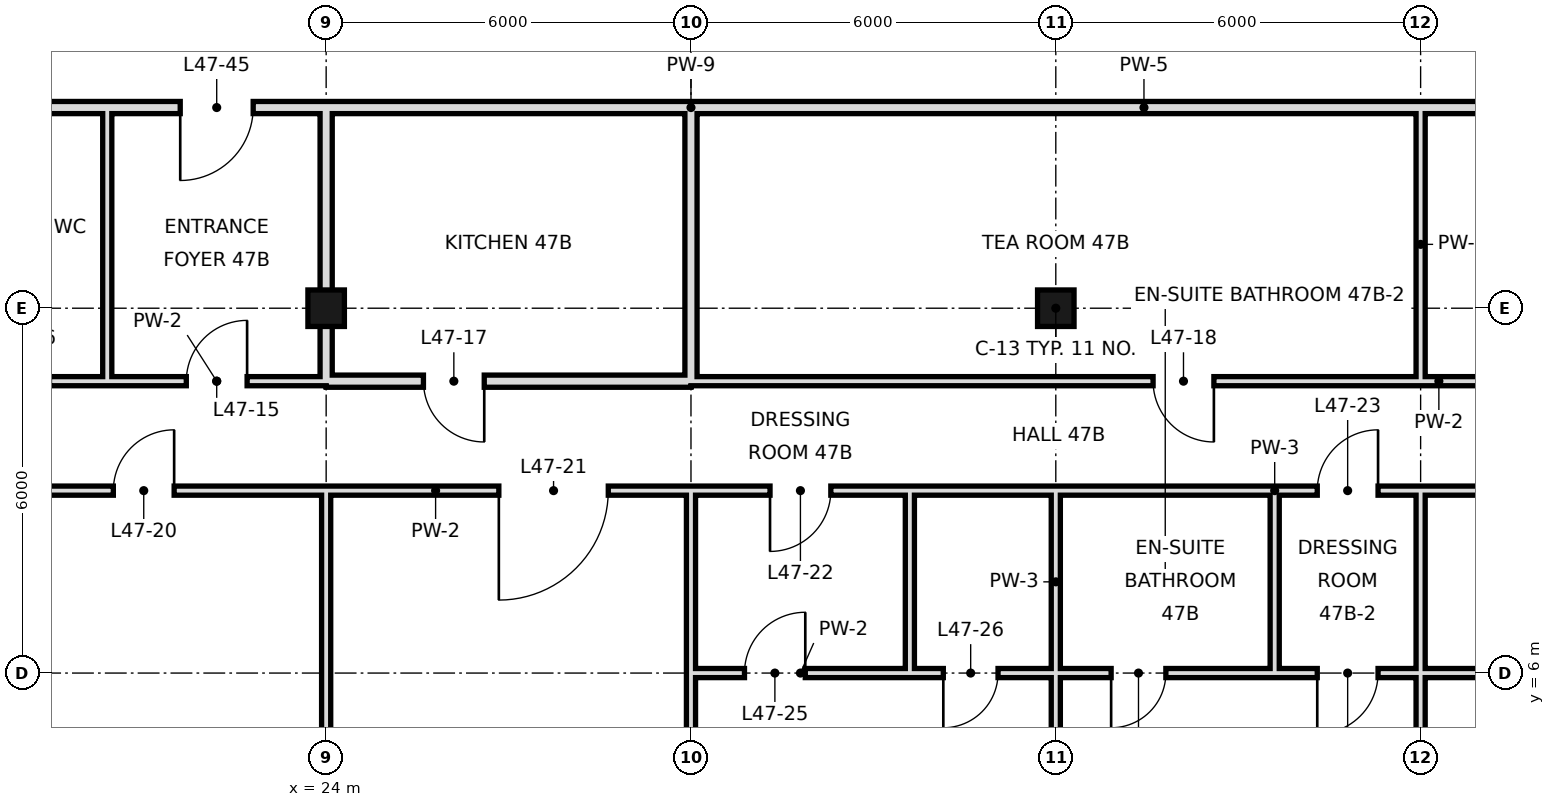
"""IFC4 building model, lengths in metres.
Left out: names, types, materials, properties, quantities, classifications, styles, units other than length and angle.
Written with IfcOpenShell. Run it as: python <this file> out.ifc"""

import sys

from ifc_helpers import new_model, si_unit, direction, frame, frame_2d, origin, origin_2d, place, context, subcontext, project, spatial, rectangle, hollow_rectangle, extrude, element, fill, save


model = new_model("IFC4")
c1 = context("Model", 3, precision=1e-05, world=origin(), true_north=direction((0.0, 1.0)))
c2 = subcontext(c1, "Body", "Model", "MODEL_VIEW")
j1 = project(units=[si_unit("LENGTHUNIT", "METRE"), si_unit("PLANEANGLEUNIT", "RADIAN")], contexts=[c1])
p1 = place(None, origin())
s1 = spatial("IfcSite", under=j1, at=p1, CompositionType="ELEMENT")
p2 = place(p1, origin())
s2 = spatial("IfcBuilding", under=s1, at=p2, CompositionType="ELEMENT")
p3 = place(p2, frame((0.0, 0.0, 202.8)))
s3 = spatial("IfcBuildingStorey", under=s2, at=p3, CompositionType="ELEMENT", Elevation=202.8)
for number, where, z_axis, x_axis in (
    (1, (24.0, 12.0, 0.0), (0.0, 0.0, 1.0), (1.0, 0.0, 0.0)),
    (2, (36.0, 12.0, 0.0), (0.0, 0.0, 1.0), (1.0, 0.0, 0.0)),
):
    element("IfcColumn", number, at=place(p3, frame(where, z_axis=z_axis, x_axis=x_axis)), inside=s3, PredefinedType="COLUMN", context=c2, shape_type="SweptSolid", body=[
        extrude(hollow_rectangle(XDim=0.6, YDim=0.6, WallThickness=0.028, at=origin_2d()), origin(), (0.0, 0.0, 1.0), 3.6),
    ])
p4 = place(p3, frame((20.4, 10.8, 0.0), z_axis=(0.0, 0.0, 1.0), x_axis=(0.0, 1.0, 0.0)))
e3 = element("IfcWall", 3, at=p4, inside=s3, PredefinedType="PARTITIONING", context=c2, shape_type="SweptSolid", body=[
    extrude(rectangle(XDim=4.5, YDim=0.15, at=frame_2d((2.25, 0.0))), origin(), (0.0, 0.0, 1.0), 3.42),
])
p5 = place(p3, frame((24.0, 10.8, 0.0), z_axis=(0.0, 0.0, 1.0), x_axis=(0.0, 1.0, 0.0)))
e4 = element("IfcWall", 4, at=p5, inside=s3, PredefinedType="SOLIDWALL", context=c2, shape_type="SweptSolid", body=[
    extrude(rectangle(XDim=4.5, YDim=0.2, at=frame_2d((2.25, 0.0))), origin(), (0.0, 0.0, 1.0), 2.72),
])
p6 = place(p3, frame((24.0, 0.0, 0.0), z_axis=(0.0, 0.0, 1.0), x_axis=(0.0, 1.0, 0.0)))
e5 = element("IfcWall", 5, at=p6, inside=s3, PredefinedType="PARTITIONING", context=c2, shape_type="SweptSolid", body=[
    extrude(rectangle(XDim=9.0, YDim=0.15, at=frame_2d((4.5, 0.0))), origin(), (0.0, 0.0, 1.0), 2.72),
])
p7 = place(p3, frame((30.0, 10.8, 0.0), z_axis=(0.0, 0.0, 1.0), x_axis=(0.0, 1.0, 0.0)))
e6 = element("IfcWall", 6, at=p7, inside=s3, PredefinedType="SOLIDWALL", context=c2, shape_type="SweptSolid", body=[
    extrude(rectangle(XDim=4.5, YDim=0.2, at=frame_2d((2.25, 0.0))), origin(), (0.0, 0.0, 1.0), 2.72),
])
p8 = place(p3, frame((30.0, -0.6, 0.0), z_axis=(0.0, 0.0, 1.0), x_axis=(0.0, 1.0, 0.0)))
e7 = element("IfcWall", 7, at=p8, inside=s3, PredefinedType="PARTITIONING", context=c2, shape_type="SweptSolid", body=[
    extrude(rectangle(XDim=9.6, YDim=0.15, at=frame_2d((4.8, 0.0))), origin(), (0.0, 0.0, 1.0), 2.72),
])
p9 = place(p3, frame((33.6, 6.0, 0.0), z_axis=(0.0, 0.0, 1.0), x_axis=(0.0, 1.0, 0.0)))
e8 = element("IfcWall", 8, at=p9, inside=s3, PredefinedType="PARTITIONING", context=c2, shape_type="SweptSolid", body=[
    extrude(rectangle(XDim=3.0, YDim=0.15, at=frame_2d((1.5, 0.0))), origin(), (0.0, 0.0, 1.0), 3.42),
])
p10 = place(p3, frame((36.0, 0.0, 0.0), z_axis=(0.0, 0.0, 1.0), x_axis=(0.0, 1.0, 0.0)))
e9 = element("IfcWall", 9, at=p10, inside=s3, PredefinedType="PARTITIONING", context=c2, shape_type="SweptSolid", body=[
    extrude(rectangle(XDim=6.0, YDim=0.15, at=frame_2d((3.0, 0.0))), origin(), (0.0, 0.0, 1.0), 2.72),
])
p11 = place(p3, frame((36.0, 6.0, 0.0), z_axis=(0.0, 0.0, 1.0), x_axis=(0.0, 1.0, 0.0)))
e10 = element("IfcWall", 10, at=p11, inside=s3, PredefinedType="PARTITIONING", context=c2, shape_type="SweptSolid", body=[
    extrude(rectangle(XDim=3.0, YDim=0.15, at=frame_2d((1.5, 0.0))), origin(), (0.0, 0.0, 1.0), 2.72),
])
p12 = place(p3, frame((39.6, 6.0, 0.0), z_axis=(0.0, 0.0, 1.0), x_axis=(0.0, 1.0, 0.0)))
e11 = element("IfcWall", 11, at=p12, inside=s3, PredefinedType="PARTITIONING", context=c2, shape_type="SweptSolid", body=[
    extrude(rectangle(XDim=3.0, YDim=0.15, at=frame_2d((1.5, 0.0))), origin(), (0.0, 0.0, 1.0), 3.42),
])
p13 = place(p3, frame((42.0, -0.6, 0.0), z_axis=(0.0, 0.0, 1.0), x_axis=(0.0, 1.0, 0.0)))
e12 = element("IfcWall", 12, at=p13, inside=s3, PredefinedType="PARTITIONING", context=c2, shape_type="SweptSolid", body=[
    extrude(rectangle(XDim=9.6, YDim=0.15, at=frame_2d((4.8, 0.0))), origin(), (0.0, 0.0, 1.0), 2.72),
])
p14 = place(p3, frame((42.0, 10.8, 0.0), z_axis=(0.0, 0.0, 1.0), x_axis=(0.0, 1.0, 0.0)))
e13 = element("IfcWall", 13, at=p14, inside=s3, PredefinedType="PARTITIONING", context=c2, shape_type="SweptSolid", body=[
    extrude(rectangle(XDim=4.5, YDim=0.15, at=frame_2d((2.25, 0.0))), origin(), (0.0, 0.0, 1.0), 2.72),
])
p15 = place(p3, frame((24.0, 10.8, 0.0), z_axis=(0.0, 0.0, 1.0), x_axis=(1.0, 0.0, 0.0)))
e14 = element("IfcWall", 14, at=p15, inside=s3, PredefinedType="SOLIDWALL", context=c2, shape_type="SweptSolid", body=[
    extrude(rectangle(XDim=6.0, YDim=0.2, at=frame_2d((3.0, 0.0))), origin(), (0.0, 0.0, 1.0), 2.72),
])
p16 = place(p15, frame((1.6, 0.0, 0.0)))
e15 = element("IfcOpeningElement", 15, at=p16, cuts=e14, PredefinedType="OPENING", context=c2, shape_type="SweptSolid", body=[
    extrude(rectangle(XDim=1.0, YDim=2.4, at=frame_2d((0.5, 1.2))), frame((0.0, 0.11, 0.0), z_axis=(0.0, -1.0, 0.0), x_axis=(1.0, 0.0, 0.0)), (0.0, 0.0, 1.0), 0.22),
])
p17 = place(p3, frame((20.4, 10.8, 0.0), z_axis=(0.0, 0.0, 1.0), x_axis=(1.0, 0.0, 0.0)))
e16 = element("IfcWall", 16, at=p17, inside=s3, PredefinedType="PARTITIONING", context=c2, shape_type="SweptSolid", body=[
    extrude(rectangle(XDim=3.6, YDim=0.15, at=frame_2d((1.8, 0.0))), origin(), (0.0, 0.0, 1.0), 3.42),
])
p18 = place(p17, frame((1.3, 0.0, 0.0)))
e17 = element("IfcOpeningElement", 17, at=p18, cuts=e16, PredefinedType="OPENING", context=c2, shape_type="SweptSolid", body=[
    extrude(rectangle(XDim=1.0, YDim=2.4, at=frame_2d((0.5, 1.2))), frame((0.0, 0.085, 0.0), z_axis=(0.0, -1.0, 0.0), x_axis=(1.0, 0.0, 0.0)), (0.0, 0.0, 1.0), 0.17),
])
p19 = place(p3, frame((30.0, 10.8, 0.0), z_axis=(0.0, 0.0, 1.0), x_axis=(1.0, 0.0, 0.0)))
e18 = element("IfcWall", 18, at=p19, inside=s3, PredefinedType="PARTITIONING", context=c2, shape_type="SweptSolid", body=[
    extrude(rectangle(XDim=24.6, YDim=0.15, at=frame_2d((12.3, 0.0))), origin(), (0.0, 0.0, 1.0), 3.42),
])
p20 = place(p19, frame((7.6, 0.0, 0.0)))
e19 = element("IfcOpeningElement", 19, at=p20, cuts=e18, PredefinedType="OPENING", context=c2, shape_type="SweptSolid", body=[
    extrude(rectangle(XDim=1.0, YDim=2.4, at=frame_2d((0.5, 1.2))), frame((0.0, 0.085, 0.0), z_axis=(0.0, -1.0, 0.0), x_axis=(1.0, 0.0, 0.0)), (0.0, 0.0, 1.0), 0.17),
])
p21 = place(p19, frame((15.4, 0.0, 0.0)))
e20 = element("IfcOpeningElement", 20, at=p21, cuts=e18, PredefinedType="OPENING", context=c2, shape_type="SweptSolid", body=[
    extrude(rectangle(XDim=1.0, YDim=2.4, at=frame_2d((0.5, 1.2))), frame((0.0, 0.085, 0.0), z_axis=(0.0, -1.0, 0.0), x_axis=(1.0, 0.0, 0.0)), (0.0, 0.0, 1.0), 0.17),
])
p22 = place(p3, frame((15.6, 10.8, 0.0), z_axis=(0.0, 0.0, 1.0), x_axis=(1.0, 0.0, 0.0)))
e21 = element("IfcWall", 21, at=p22, inside=s3, PredefinedType="PARTITIONING", context=c2, shape_type="SweptSolid", body=[
    extrude(rectangle(XDim=4.8, YDim=0.15, at=frame_2d((2.4, 0.0))), origin(), (0.0, 0.0, 1.0), 3.42),
])
p23 = place(p22, frame((0.75, 0.0, 0.0)))
e22 = element("IfcOpeningElement", 22, at=p23, cuts=e21, PredefinedType="OPENING", context=c2, shape_type="SweptSolid", body=[
    extrude(rectangle(XDim=0.9, YDim=2.4, at=frame_2d((0.45, 1.2))), frame((0.0, 0.085, 0.0), z_axis=(0.0, -1.0, 0.0), x_axis=(1.0, 0.0, 0.0)), (0.0, 0.0, 1.0), 0.17),
])
p24 = place(p22, frame((2.95, 0.0, 0.0)))
e23 = element("IfcOpeningElement", 23, at=p24, cuts=e21, PredefinedType="OPENING", context=c2, shape_type="SweptSolid", body=[
    extrude(rectangle(XDim=0.9, YDim=2.4, at=frame_2d((0.45, 1.2))), frame((0.0, 0.085, 0.0), z_axis=(0.0, -1.0, 0.0), x_axis=(1.0, 0.0, 0.0)), (0.0, 0.0, 1.0), 0.17),
])
p25 = place(p3, frame((3.1, 15.3, 0.0), z_axis=(0.0, 0.0, 1.0), x_axis=(1.0, 0.0, 0.0)))
e24 = element("IfcWall", 24, at=p25, inside=s3, PredefinedType="SOLIDWALL", context=c2, shape_type="SweptSolid", body=[
    extrude(rectangle(XDim=20.9, YDim=0.2, at=frame_2d((10.45, 0.0))), origin(), (0.0, 0.0, 1.0), 2.72),
])
p26 = place(p25, frame((9.72, 0.0, 0.0)))
e25 = element("IfcOpeningElement", 25, at=p26, cuts=e24, PredefinedType="OPENING", context=c2, shape_type="SweptSolid", body=[
    extrude(rectangle(XDim=1.2, YDim=2.4, at=frame_2d((0.6, 1.2))), frame((0.0, 0.11, 0.0), z_axis=(0.0, -1.0, 0.0), x_axis=(1.0, 0.0, 0.0)), (0.0, 0.0, 1.0), 0.22),
])
p27 = place(p25, frame((18.5, 0.0, 0.0)))
e26 = element("IfcOpeningElement", 26, at=p27, cuts=e24, PredefinedType="OPENING", context=c2, shape_type="SweptSolid", body=[
    extrude(rectangle(XDim=1.2, YDim=2.4, at=frame_2d((0.6, 1.2))), frame((0.0, 0.11, 0.0), z_axis=(0.0, -1.0, 0.0), x_axis=(1.0, 0.0, 0.0)), (0.0, 0.0, 1.0), 0.22),
])
p28 = place(p3, frame((30.0, 15.3, 0.0), z_axis=(0.0, 0.0, 1.0), x_axis=(1.0, 0.0, 0.0)))
e27 = element("IfcWall", 27, at=p28, inside=s3, PredefinedType="SOLIDWALL", context=c2, shape_type="SweptSolid", body=[
    extrude(rectangle(XDim=14.9, YDim=0.2, at=frame_2d((7.45, 0.0))), origin(), (0.0, 0.0, 1.0), 2.72),
])
p29 = place(p3, frame((24.0, 15.3, 0.0), z_axis=(0.0, 0.0, 1.0), x_axis=(1.0, 0.0, 0.0)))
e28 = element("IfcWall", 28, at=p29, inside=s3, PredefinedType="SOLIDWALL", context=c2, shape_type="SweptSolid", body=[
    extrude(rectangle(XDim=6.0, YDim=0.2, at=frame_2d((3.0, 0.0))), origin(), (0.0, 0.0, 1.0), 2.72),
])
p30 = place(p3, frame((30.0, 6.0, 0.0), z_axis=(0.0, 0.0, 1.0), x_axis=(1.0, 0.0, 0.0)))
e29 = element("IfcWall", 29, at=p30, inside=s3, PredefinedType="PARTITIONING", context=c2, shape_type="SweptSolid", body=[
    extrude(rectangle(XDim=3.6, YDim=0.15, at=frame_2d((1.8, 0.0))), origin(), (0.0, 0.0, 1.0), 2.97),
])
p31 = place(p30, frame((0.88, 0.0, 0.0)))
e30 = element("IfcOpeningElement", 30, at=p31, cuts=e29, PredefinedType="OPENING", context=c2, shape_type="SweptSolid", body=[
    extrude(rectangle(XDim=1.0, YDim=2.4, at=frame_2d((0.5, 1.2))), frame((0.0, 0.085, 0.0), z_axis=(0.0, -1.0, 0.0), x_axis=(1.0, 0.0, 0.0)), (0.0, 0.0, 1.0), 0.17),
])
p32 = place(p3, frame((39.6, 6.0, 0.0), z_axis=(0.0, 0.0, 1.0), x_axis=(1.0, 0.0, 0.0)))
e31 = element("IfcWall", 31, at=p32, inside=s3, PredefinedType="PARTITIONING", context=c2, shape_type="SweptSolid", body=[
    extrude(rectangle(XDim=14.4, YDim=0.15, at=frame_2d((7.2, 0.0))), origin(), (0.0, 0.0, 1.0), 2.97),
])
p33 = place(p32, frame((0.7, 0.0, 0.0)))
e32 = element("IfcOpeningElement", 32, at=p33, cuts=e31, PredefinedType="OPENING", context=c2, shape_type="SweptSolid", body=[
    extrude(rectangle(XDim=1.0, YDim=2.4, at=frame_2d((0.5, 1.2))), frame((0.0, 0.085, 0.0), z_axis=(0.0, -1.0, 0.0), x_axis=(1.0, 0.0, 0.0)), (0.0, 0.0, 1.0), 0.17),
])
p34 = place(p32, frame((9.44, 0.0, 0.0)))
e33 = element("IfcOpeningElement", 33, at=p34, cuts=e31, PredefinedType="OPENING", context=c2, shape_type="SweptSolid", body=[
    extrude(rectangle(XDim=1.8, YDim=2.4, at=frame_2d((0.9, 1.2))), frame((0.0, 0.085, 0.0), z_axis=(0.0, -1.0, 0.0), x_axis=(1.0, 0.0, 0.0)), (0.0, 0.0, 1.0), 0.17),
])
p35 = place(p3, frame((33.6, 6.0, 0.0), z_axis=(0.0, 0.0, 1.0), x_axis=(1.0, 0.0, 0.0)))
e34 = element("IfcWall", 34, at=p35, inside=s3, PredefinedType="PARTITIONING", context=c2, shape_type="SweptSolid", body=[
    extrude(rectangle(XDim=6.0, YDim=0.15, at=frame_2d((3.0, 0.0))), origin(), (0.0, 0.0, 1.0), 2.97),
])
p36 = place(p35, frame((0.55, 0.0, 0.0)))
e35 = element("IfcOpeningElement", 35, at=p36, cuts=e34, PredefinedType="OPENING", context=c2, shape_type="SweptSolid", body=[
    extrude(rectangle(XDim=0.9, YDim=2.4, at=frame_2d((0.45, 1.2))), frame((0.0, 0.085, 0.0), z_axis=(0.0, -1.0, 0.0), x_axis=(1.0, 0.0, 0.0)), (0.0, 0.0, 1.0), 0.17),
])
p37 = place(p35, frame((3.31, 0.0, 0.0)))
e36 = element("IfcOpeningElement", 36, at=p37, cuts=e34, PredefinedType="OPENING", context=c2, shape_type="SweptSolid", body=[
    extrude(rectangle(XDim=0.9, YDim=2.4, at=frame_2d((0.45, 1.2))), frame((0.0, 0.085, 0.0), z_axis=(0.0, -1.0, 0.0), x_axis=(1.0, 0.0, 0.0)), (0.0, 0.0, 1.0), 0.17),
])
p38 = place(p3, frame((18.0, 9.0, 0.0), z_axis=(0.0, 0.0, 1.0), x_axis=(1.0, 0.0, 0.0)))
e37 = element("IfcWall", 37, at=p38, inside=s3, PredefinedType="PARTITIONING", context=c2, shape_type="SweptSolid", body=[
    extrude(rectangle(XDim=15.6, YDim=0.15, at=frame_2d((7.8, 0.0))), origin(), (0.0, 0.0, 1.0), 3.42),
])
p39 = place(p38, frame((2.5, 0.0, 0.0)))
e38 = element("IfcOpeningElement", 38, at=p39, cuts=e37, PredefinedType="OPENING", context=c2, shape_type="SweptSolid", body=[
    extrude(rectangle(XDim=1.0, YDim=2.4, at=frame_2d((0.5, 1.2))), frame((0.0, 0.085, 0.0), z_axis=(0.0, -1.0, 0.0), x_axis=(1.0, 0.0, 0.0)), (0.0, 0.0, 1.0), 0.17),
])
p40 = place(p38, frame((8.84, 0.0, 0.0)))
e39 = element("IfcOpeningElement", 39, at=p40, cuts=e37, PredefinedType="OPENING", context=c2, shape_type="SweptSolid", body=[
    extrude(rectangle(XDim=1.8, YDim=2.4, at=frame_2d((0.9, 1.2))), frame((0.0, 0.085, 0.0), z_axis=(0.0, -1.0, 0.0), x_axis=(1.0, 0.0, 0.0)), (0.0, 0.0, 1.0), 0.17),
])
p41 = place(p38, frame((13.3, 0.0, 0.0)))
e40 = element("IfcOpeningElement", 40, at=p41, cuts=e37, PredefinedType="OPENING", context=c2, shape_type="SweptSolid", body=[
    extrude(rectangle(XDim=1.0, YDim=2.4, at=frame_2d((0.5, 1.2))), frame((0.0, 0.085, 0.0), z_axis=(0.0, -1.0, 0.0), x_axis=(1.0, 0.0, 0.0)), (0.0, 0.0, 1.0), 0.17),
])
p42 = place(p3, frame((39.6, 9.0, 0.0), z_axis=(0.0, 0.0, 1.0), x_axis=(1.0, 0.0, 0.0)))
e41 = element("IfcWall", 41, at=p42, inside=s3, PredefinedType="PARTITIONING", context=c2, shape_type="SweptSolid", body=[
    extrude(rectangle(XDim=15.0, YDim=0.15, at=frame_2d((7.5, 0.0))), origin(), (0.0, 0.0, 1.0), 3.42),
])
p43 = place(p42, frame((0.7, 0.0, 0.0)))
e42 = element("IfcOpeningElement", 42, at=p43, cuts=e41, PredefinedType="OPENING", context=c2, shape_type="SweptSolid", body=[
    extrude(rectangle(XDim=1.0, YDim=2.4, at=frame_2d((0.5, 1.2))), frame((0.0, 0.085, 0.0), z_axis=(0.0, -1.0, 0.0), x_axis=(1.0, 0.0, 0.0)), (0.0, 0.0, 1.0), 0.17),
])
p44 = place(p42, frame((5.56, 0.0, 0.0)))
e43 = element("IfcOpeningElement", 43, at=p44, cuts=e41, PredefinedType="OPENING", context=c2, shape_type="SweptSolid", body=[
    extrude(rectangle(XDim=1.8, YDim=2.4, at=frame_2d((0.9, 1.2))), frame((0.0, 0.085, 0.0), z_axis=(0.0, -1.0, 0.0), x_axis=(1.0, 0.0, 0.0)), (0.0, 0.0, 1.0), 0.17),
])
p45 = place(p3, frame((33.6, 9.0, 0.0), z_axis=(0.0, 0.0, 1.0), x_axis=(1.0, 0.0, 0.0)))
e44 = element("IfcWall", 44, at=p45, inside=s3, PredefinedType="PARTITIONING", context=c2, shape_type="SweptSolid", body=[
    extrude(rectangle(XDim=6.0, YDim=0.15, at=frame_2d((3.0, 0.0))), origin(), (0.0, 0.0, 1.0), 3.42),
])
p46 = place(p18, frame((1.0, 0.0, 0.0), z_axis=(0.0, 0.0, 1.0), x_axis=(-1.0, 0.0, 0.0)))
e45 = element("IfcDoor", 45, at=p46, inside=s3, OperationType="SINGLE_SWING_LEFT", PredefinedType="DOOR", context=c2, shape_type="SweptSolid", body=[
    extrude(rectangle(XDim=1.0, YDim=2.4, at=frame_2d((0.5, 1.2))), frame((0.0, 0.025, 0.0), z_axis=(0.0, -1.0, 0.0), x_axis=(1.0, 0.0, 0.0)), (0.0, 0.0, 1.0), 0.05),
])
fill(e17, e45)
p47 = place(p16, origin())
e46 = element("IfcDoor", 46, at=p47, inside=s3, OperationType="SINGLE_SWING_RIGHT", PredefinedType="DOOR", context=c2, shape_type="SweptSolid", body=[
    extrude(rectangle(XDim=1.0, YDim=2.4, at=frame_2d((0.5, 1.2))), frame((0.0, 0.025, 0.0), z_axis=(0.0, -1.0, 0.0), x_axis=(1.0, 0.0, 0.0)), (0.0, 0.0, 1.0), 0.05),
])
fill(e15, e46)
p48 = place(p20, origin())
e47 = element("IfcDoor", 47, at=p48, inside=s3, OperationType="SINGLE_SWING_RIGHT", PredefinedType="DOOR", context=c2, shape_type="SweptSolid", body=[
    extrude(rectangle(XDim=1.0, YDim=2.4, at=frame_2d((0.5, 1.2))), frame((0.0, 0.025, 0.0), z_axis=(0.0, -1.0, 0.0), x_axis=(1.0, 0.0, 0.0)), (0.0, 0.0, 1.0), 0.05),
])
fill(e19, e47)
p49 = place(p39, frame((1.0, 0.0, 0.0), z_axis=(0.0, 0.0, 1.0), x_axis=(-1.0, 0.0, 0.0)))
e48 = element("IfcDoor", 48, at=p49, inside=s3, OperationType="SINGLE_SWING_LEFT", PredefinedType="DOOR", context=c2, shape_type="SweptSolid", body=[
    extrude(rectangle(XDim=1.0, YDim=2.4, at=frame_2d((0.5, 1.2))), frame((0.0, 0.025, 0.0), z_axis=(0.0, -1.0, 0.0), x_axis=(1.0, 0.0, 0.0)), (0.0, 0.0, 1.0), 0.05),
])
fill(e38, e48)
p50 = place(p40, frame((1.8, 0.0, 0.0), z_axis=(0.0, 0.0, 1.0), x_axis=(-1.0, 0.0, 0.0)))
e49 = element("IfcDoor", 49, at=p50, inside=s3, OperationType="SINGLE_SWING_RIGHT", PredefinedType="DOOR", context=c2, shape_type="SweptSolid", body=[
    extrude(rectangle(XDim=1.8, YDim=2.4, at=frame_2d((0.9, 1.2))), frame((0.0, 0.025, 0.0), z_axis=(0.0, -1.0, 0.0), x_axis=(1.0, 0.0, 0.0)), (0.0, 0.0, 1.0), 0.05),
])
fill(e39, e49)
p51 = place(p41, frame((1.0, 0.0, 0.0), z_axis=(0.0, 0.0, 1.0), x_axis=(-1.0, 0.0, 0.0)))
e50 = element("IfcDoor", 50, at=p51, inside=s3, OperationType="SINGLE_SWING_RIGHT", PredefinedType="DOOR", context=c2, shape_type="SweptSolid", body=[
    extrude(rectangle(XDim=1.0, YDim=2.4, at=frame_2d((0.5, 1.2))), frame((0.0, 0.025, 0.0), z_axis=(0.0, -1.0, 0.0), x_axis=(1.0, 0.0, 0.0)), (0.0, 0.0, 1.0), 0.05),
])
fill(e40, e50)
p52 = place(p43, frame((1.0, 0.0, 0.0), z_axis=(0.0, 0.0, 1.0), x_axis=(-1.0, 0.0, 0.0)))
e51 = element("IfcDoor", 51, at=p52, inside=s3, OperationType="SINGLE_SWING_LEFT", PredefinedType="DOOR", context=c2, shape_type="SweptSolid", body=[
    extrude(rectangle(XDim=1.0, YDim=2.4, at=frame_2d((0.5, 1.2))), frame((0.0, 0.025, 0.0), z_axis=(0.0, -1.0, 0.0), x_axis=(1.0, 0.0, 0.0)), (0.0, 0.0, 1.0), 0.05),
])
fill(e42, e51)
p53 = place(p31, frame((1.0, 0.0, 0.0), z_axis=(0.0, 0.0, 1.0), x_axis=(-1.0, 0.0, 0.0)))
e52 = element("IfcDoor", 52, at=p53, inside=s3, OperationType="SINGLE_SWING_LEFT", PredefinedType="DOOR", context=c2, shape_type="SweptSolid", body=[
    extrude(rectangle(XDim=1.0, YDim=2.4, at=frame_2d((0.5, 1.2))), frame((0.0, 0.025, 0.0), z_axis=(0.0, -1.0, 0.0), x_axis=(1.0, 0.0, 0.0)), (0.0, 0.0, 1.0), 0.05),
])
fill(e30, e52)
p54 = place(p36, frame((0.9, 0.0, 0.0), z_axis=(0.0, 0.0, 1.0), x_axis=(-1.0, 0.0, 0.0)))
e53 = element("IfcDoor", 53, at=p54, inside=s3, OperationType="SINGLE_SWING_RIGHT", PredefinedType="DOOR", context=c2, shape_type="SweptSolid", body=[
    extrude(rectangle(XDim=0.9, YDim=2.4, at=frame_2d((0.45, 1.2))), frame((0.0, 0.025, 0.0), z_axis=(0.0, -1.0, 0.0), x_axis=(1.0, 0.0, 0.0)), (0.0, 0.0, 1.0), 0.05),
])
fill(e35, e53)
p55 = place(p33, frame((1.0, 0.0, 0.0), z_axis=(0.0, 0.0, 1.0), x_axis=(-1.0, 0.0, 0.0)))
e54 = element("IfcDoor", 54, at=p55, inside=s3, OperationType="SINGLE_SWING_RIGHT", PredefinedType="DOOR", context=c2, shape_type="SweptSolid", body=[
    extrude(rectangle(XDim=1.0, YDim=2.4, at=frame_2d((0.5, 1.2))), frame((0.0, 0.025, 0.0), z_axis=(0.0, -1.0, 0.0), x_axis=(1.0, 0.0, 0.0)), (0.0, 0.0, 1.0), 0.05),
])
fill(e32, e54)
p56 = place(p37, frame((0.9, 0.0, 0.0), z_axis=(0.0, 0.0, 1.0), x_axis=(-1.0, 0.0, 0.0)))
e55 = element("IfcDoor", 55, at=p56, inside=s3, OperationType="SINGLE_SWING_RIGHT", PredefinedType="DOOR", context=c2, shape_type="SweptSolid", body=[
    extrude(rectangle(XDim=0.9, YDim=2.4, at=frame_2d((0.45, 1.2))), frame((0.0, 0.025, 0.0), z_axis=(0.0, -1.0, 0.0), x_axis=(1.0, 0.0, 0.0)), (0.0, 0.0, 1.0), 0.05),
])
fill(e36, e55)
p57 = place(p27, frame((1.2, 0.0, 0.0), z_axis=(0.0, 0.0, 1.0), x_axis=(-1.0, 0.0, 0.0)))
e56 = element("IfcDoor", 56, at=p57, inside=s3, OperationType="SINGLE_SWING_RIGHT", PredefinedType="DOOR", context=c2, shape_type="SweptSolid", body=[
    extrude(rectangle(XDim=1.2, YDim=2.4, at=frame_2d((0.6, 1.2))), frame((0.0, 0.025, 0.0), z_axis=(0.0, -1.0, 0.0), x_axis=(1.0, 0.0, 0.0)), (0.0, 0.0, 1.0), 0.05),
])
fill(e26, e56)
save(model, sys.argv[1])
